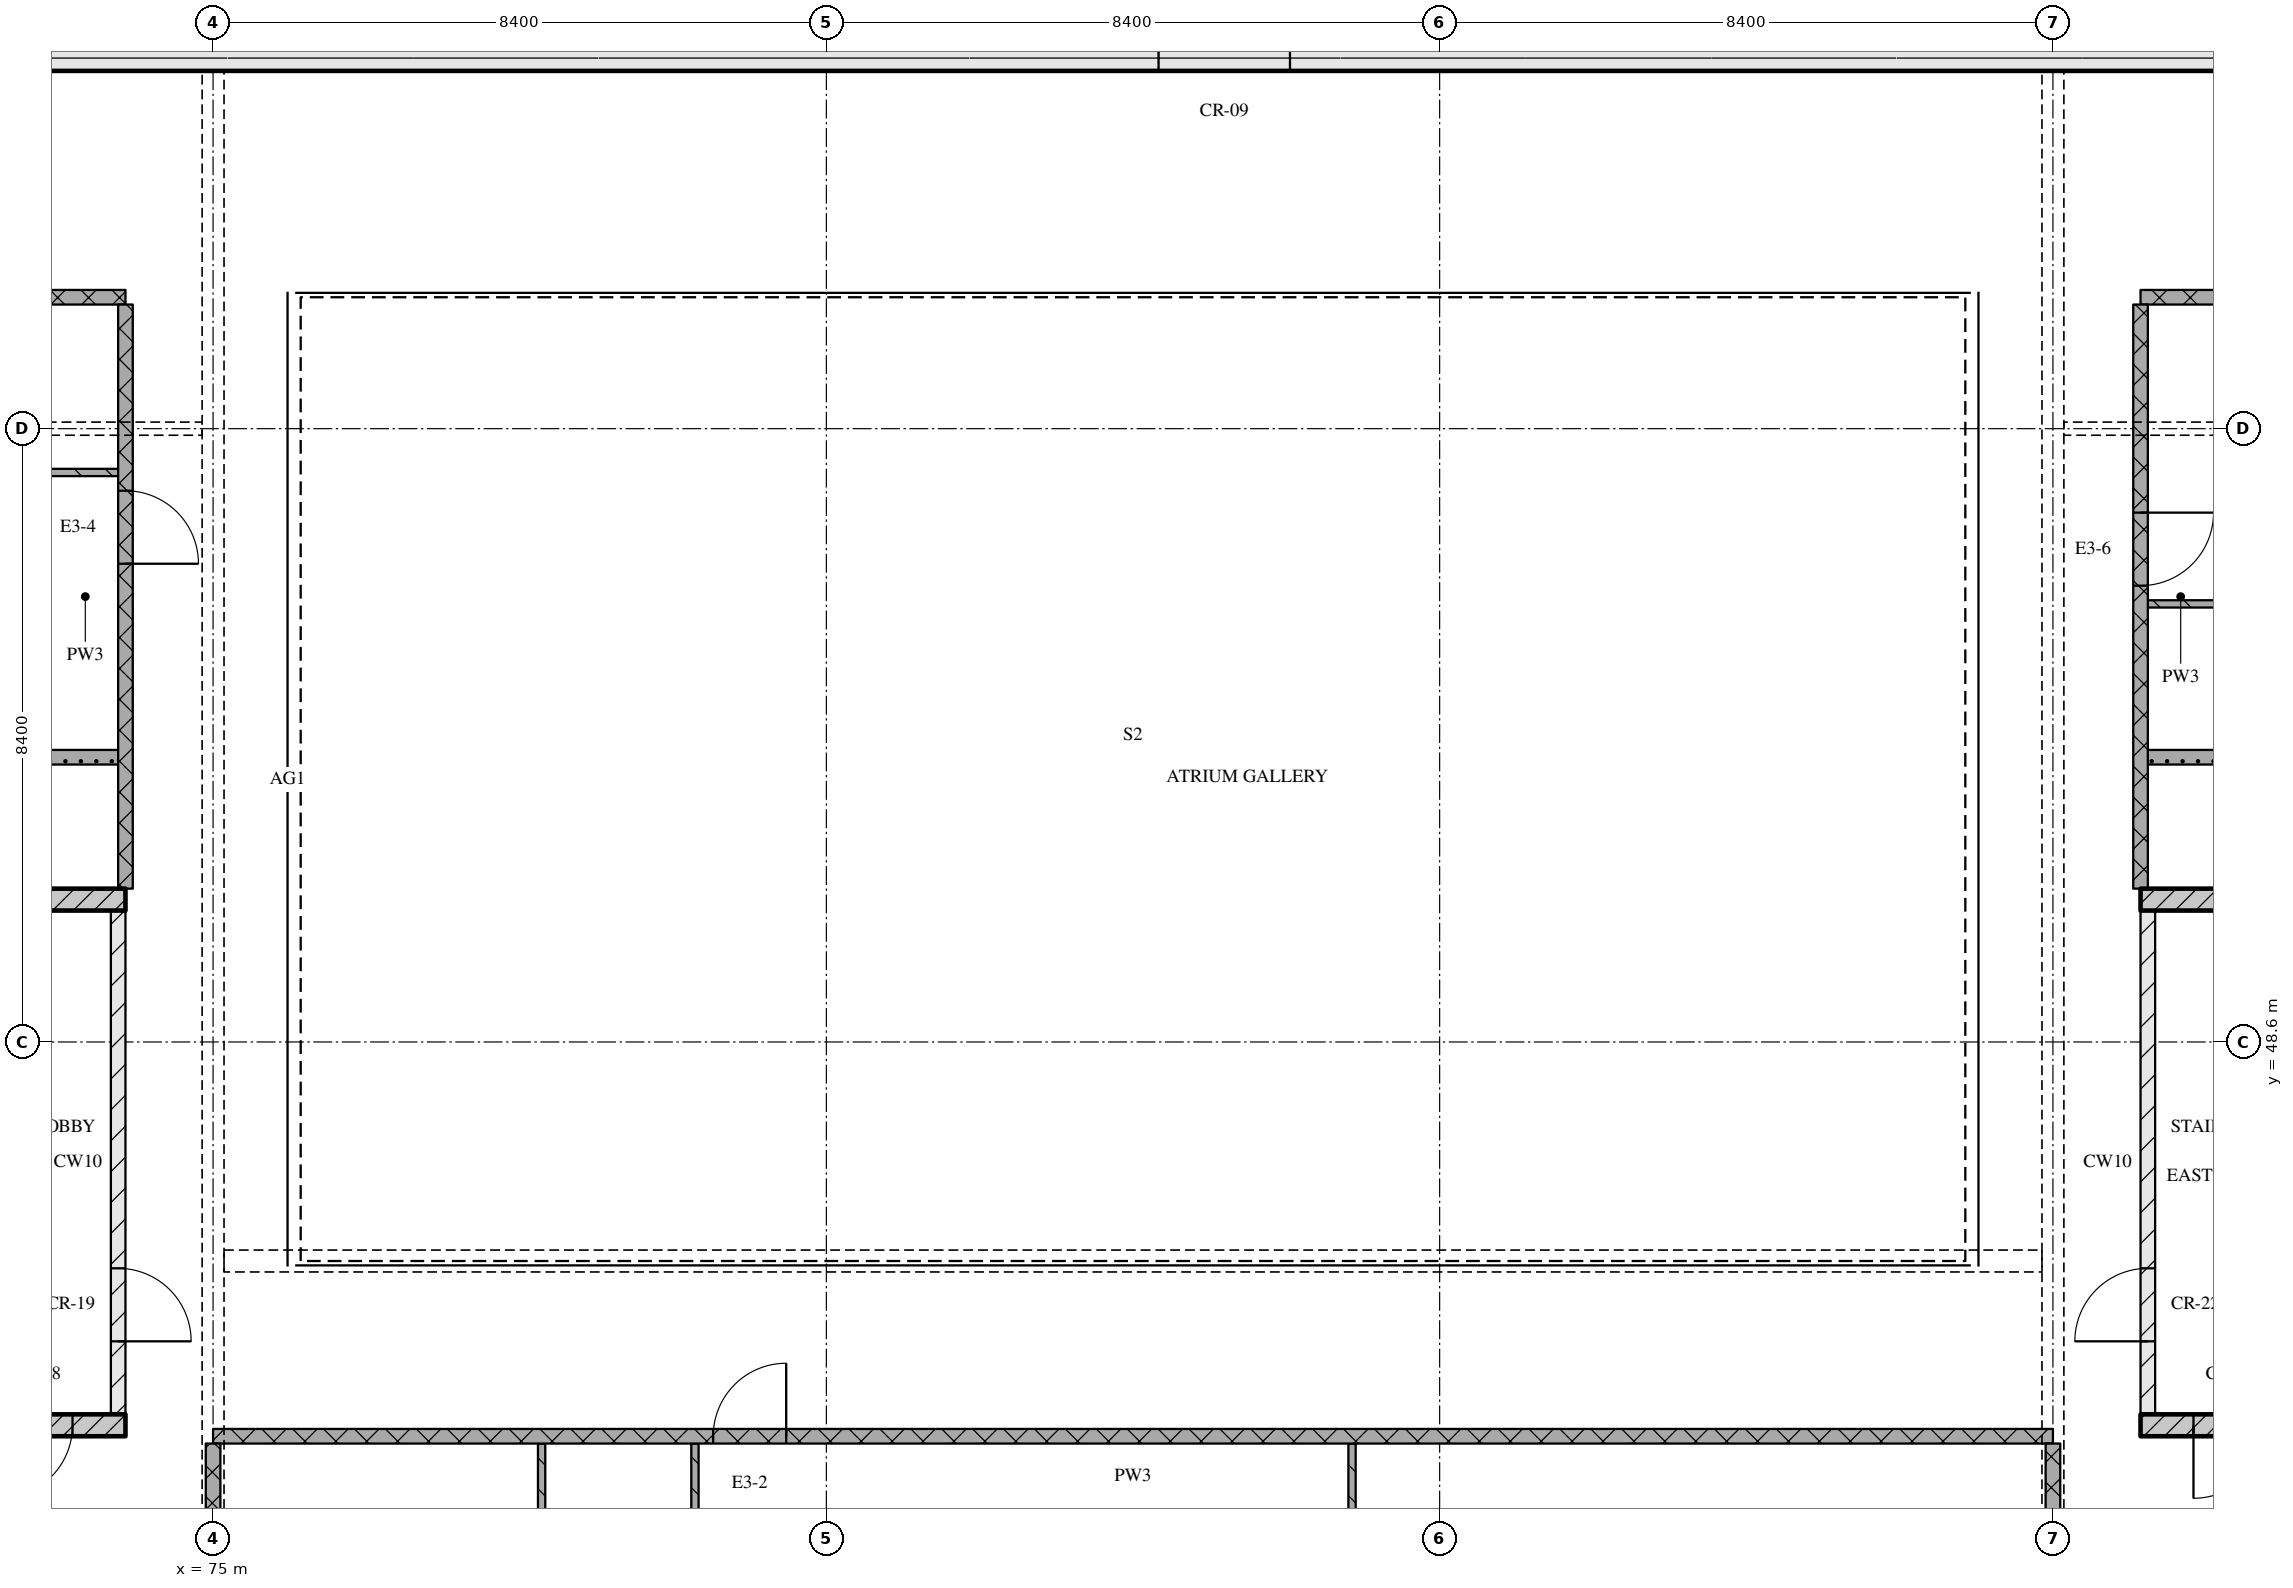
"""IFC4 building model, lengths in metres.
Left out: names, types, materials, properties, quantities, classifications, styles, units other than length and angle.
Written with IfcOpenShell. Run it as: python <this file> out.ifc"""

import sys

from ifc_helpers import new_model, si_unit, direction, frame, frame_2d, origin, place, context, subcontext, project, spatial, rectangle, extrude, element, fill, save


model = new_model("IFC4")
c1 = context("Model", 3, precision=1e-05, world=origin(), true_north=direction((0.0, 1.0)))
c2 = subcontext(c1, "Body", "Model", "MODEL_VIEW")
j1 = project(units=[si_unit("LENGTHUNIT", "METRE"), si_unit("PLANEANGLEUNIT", "RADIAN")], contexts=[c1])
p1 = place(None, origin())
s1 = spatial("IfcSite", under=j1, at=p1, CompositionType="ELEMENT")
p2 = place(p1, origin())
s2 = spatial("IfcBuilding", under=s1, at=p2, CompositionType="ELEMENT")
p3 = place(p2, frame((0.0, 0.0, 277.95)))
s3 = spatial("IfcBuildingStorey", under=s2, at=p3, CompositionType="ELEMENT", Elevation=277.95)
p4 = place(p3, frame((67.3, 62.15, 0.0), z_axis=(0.0, 0.0, 1.0), x_axis=(1.0, 0.0, 0.0)))
e1 = element("IfcWall", 1, at=p4, inside=s3, PredefinedType="SOLIDWALL", context=c2, shape_type="SweptSolid", body=[
    extrude(rectangle(XDim=40.6, YDim=0.5, at=frame_2d((20.3, 0.0))), origin(), (0.0, 0.0, 1.0), 3.32),
])
p5 = place(p4, frame((20.65, 0.0, 0.0)))
e2 = element("IfcOpeningElement", 2, at=p5, cuts=e1, PredefinedType="OPENING", context=c2, shape_type="SweptSolid", body=[
    extrude(rectangle(XDim=1.8, YDim=2.1, at=frame_2d((0.9, 1.05))), frame((0.0, 0.26, 0.0), z_axis=(0.0, -1.0, 0.0), x_axis=(1.0, 0.0, 0.0)), (0.0, 0.0, 1.0), 0.52),
])
p6 = place(p3, frame((68.2, 43.35, 0.0), z_axis=(0.0, 0.0, 1.0), x_axis=(1.0, 0.0, 0.0)))
e3 = element("IfcWall", 3, at=p6, inside=s3, PredefinedType="SOLIDWALL", context=c2, shape_type="SweptSolid", body=[
    extrude(rectangle(XDim=5.6, YDim=0.3, at=frame_2d((2.8, 0.0))), origin(), (0.0, 0.0, 1.0), 3.32),
])
p7 = place(p6, frame((3.875, 0.0, 0.0)))
e4 = element("IfcOpeningElement", 4, at=p7, cuts=e3, PredefinedType="OPENING", context=c2, shape_type="SweptSolid", body=[
    extrude(rectangle(XDim=1.0, YDim=2.1, at=frame_2d((0.5, 1.05))), frame((0.0, 0.16, 0.0), z_axis=(0.0, -1.0, 0.0), x_axis=(1.0, 0.0, 0.0)), (0.0, 0.0, 1.0), 0.32),
])
p8 = place(p3, frame((73.7, 43.5, 0.0), z_axis=(0.0, 0.0, 1.0), x_axis=(0.0, 1.0, 0.0)))
e5 = element("IfcWall", 5, at=p8, inside=s3, PredefinedType="PARTITIONING", context=c2, shape_type="SweptSolid", body=[
    extrude(rectangle(XDim=6.9, YDim=0.2, at=frame_2d((3.45, 0.0))), origin(), (0.0, 0.0, 1.0), 3.32),
])
p9 = place(p8, frame((1.0, 0.0, 0.0)))
e6 = element("IfcOpeningElement", 6, at=p9, cuts=e5, PredefinedType="OPENING", context=c2, shape_type="SweptSolid", body=[
    extrude(rectangle(XDim=1.0, YDim=2.1, at=frame_2d((0.5, 1.05))), frame((0.0, 0.11, 0.0), z_axis=(0.0, -1.0, 0.0), x_axis=(1.0, 0.0, 0.0)), (0.0, 0.0, 1.0), 0.22),
])
p10 = place(p3, frame((68.2, 50.55, 0.0), z_axis=(0.0, 0.0, 1.0), x_axis=(1.0, 0.0, 0.0)))
e7 = element("IfcWall", 7, at=p10, inside=s3, PredefinedType="SOLIDWALL", context=c2, shape_type="SweptSolid", body=[
    extrude(rectangle(XDim=5.6, YDim=0.3, at=frame_2d((2.8, 0.0))), origin(), (0.0, 0.0, 1.0), 3.32),
])
p11 = place(p3, frame((101.4, 43.35, 0.0), z_axis=(0.0, 0.0, 1.0), x_axis=(1.0, 0.0, 0.0)))
e8 = element("IfcWall", 8, at=p11, inside=s3, PredefinedType="SOLIDWALL", context=c2, shape_type="SweptSolid", body=[
    extrude(rectangle(XDim=5.6, YDim=0.3, at=frame_2d((2.8, 0.0))), origin(), (0.0, 0.0, 1.0), 3.32),
])
p12 = place(p11, frame((0.725, 0.0, 0.0)))
e9 = element("IfcOpeningElement", 9, at=p12, cuts=e8, PredefinedType="OPENING", context=c2, shape_type="SweptSolid", body=[
    extrude(rectangle(XDim=1.0, YDim=2.1, at=frame_2d((0.5, 1.05))), frame((0.0, 0.16, 0.0), z_axis=(0.0, -1.0, 0.0), x_axis=(1.0, 0.0, 0.0)), (0.0, 0.0, 1.0), 0.32),
])
p13 = place(p3, frame((101.5, 43.5, 0.0), z_axis=(0.0, 0.0, 1.0), x_axis=(0.0, 1.0, 0.0)))
e10 = element("IfcWall", 10, at=p13, inside=s3, PredefinedType="PARTITIONING", context=c2, shape_type="SweptSolid", body=[
    extrude(rectangle(XDim=6.9, YDim=0.2, at=frame_2d((3.45, 0.0))), origin(), (0.0, 0.0, 1.0), 3.32),
])
p14 = place(p13, frame((1.0, 0.0, 0.0)))
e11 = element("IfcOpeningElement", 11, at=p14, cuts=e10, PredefinedType="OPENING", context=c2, shape_type="SweptSolid", body=[
    extrude(rectangle(XDim=1.0, YDim=2.1, at=frame_2d((0.5, 1.05))), frame((0.0, 0.11, 0.0), z_axis=(0.0, -1.0, 0.0), x_axis=(1.0, 0.0, 0.0)), (0.0, 0.0, 1.0), 0.22),
])
p15 = place(p3, frame((101.4, 50.55, 0.0), z_axis=(0.0, 0.0, 1.0), x_axis=(1.0, 0.0, 0.0)))
e12 = element("IfcWall", 12, at=p15, inside=s3, PredefinedType="SOLIDWALL", context=c2, shape_type="SweptSolid", body=[
    extrude(rectangle(XDim=5.6, YDim=0.3, at=frame_2d((2.8, 0.0))), origin(), (0.0, 0.0, 1.0), 3.32),
])
p16 = place(p3, frame((100.2, 43.2, 0.0), z_axis=(0.0, 0.0, 1.0), x_axis=(-1.0, 0.0, 0.0)))
e13 = element("IfcWall", 13, at=p16, inside=s3, PredefinedType="PARTITIONING", context=c2, shape_type="SweptSolid", body=[
    extrude(rectangle(XDim=25.2, YDim=0.2, at=frame_2d((12.6, 0.0))), origin(), (0.0, 0.0, 1.0), 3.32),
])
p17 = place(p16, frame((17.35, 0.0, 0.0)))
e14 = element("IfcOpeningElement", 14, at=p17, cuts=e13, PredefinedType="OPENING", context=c2, shape_type="SweptSolid", body=[
    extrude(rectangle(XDim=1.0, YDim=2.1, at=frame_2d((0.5, 1.05))), frame((0.0, 0.11, 0.0), z_axis=(0.0, -1.0, 0.0), x_axis=(1.0, 0.0, 0.0)), (0.0, 0.0, 1.0), 0.22),
])
for number, where, z_axis, x_axis in (
    (15, (56.68, 52.5, 0.0), (0.0, 0.0, 1.0), (1.0, 0.0, 0.0)),
    (16, (101.5, 52.5, 0.0), (0.0, 0.0, 1.0), (1.0, 0.0, 0.0)),
):
    element("IfcWall", number, at=place(p3, frame(where, z_axis=z_axis, x_axis=x_axis)), inside=s3, PredefinedType="PARTITIONING", context=c2, shape_type="SweptSolid", body=[
        extrude(rectangle(XDim=17.02, YDim=0.2, at=frame_2d((8.51, 0.0))), origin(), (0.0, 0.0, 1.0), 3.32),
    ])
for number, where, z_axis, x_axis in (
    (17, (101.5, 54.6, 0.0), (0.0, 0.0, 1.0), (1.0, 0.0, 0.0)),
    (18, (65.7, 56.4, 0.0), (0.0, 0.0, 1.0), (1.0, 0.0, 0.0)),
):
    element("IfcWall", number, at=place(p3, frame(where, z_axis=z_axis, x_axis=x_axis)), inside=s3, PredefinedType="PARTITIONING", context=c2, shape_type="SweptSolid", body=[
        extrude(rectangle(XDim=8.0, YDim=0.1, at=frame_2d((4.0, 0.0))), origin(), (0.0, 0.0, 1.0), 3.32),
    ])
for number, where, z_axis, x_axis in (
    (19, (64.2, 58.8, 0.0), (0.0, 0.0, 1.0), (1.0, 0.0, 0.0)),
    (20, (101.4, 58.8, 0.0), (0.0, 0.0, 1.0), (1.0, 0.0, 0.0)),
):
    element("IfcWall", number, at=place(p3, frame(where, z_axis=z_axis, x_axis=x_axis)), inside=s3, PredefinedType="PARTITIONING", context=c2, shape_type="SweptSolid", body=[
        extrude(rectangle(XDim=9.6, YDim=0.2, at=frame_2d((4.8, 0.0))), origin(), (0.0, 0.0, 1.0), 3.32),
    ])
p18 = place(p3, frame((73.8, 50.7, 0.0), z_axis=(0.0, 0.0, 1.0), x_axis=(0.0, 1.0, 0.0)))
e21 = element("IfcWall", 21, at=p18, inside=s3, PredefinedType="PARTITIONING", context=c2, shape_type="SweptSolid", body=[
    extrude(rectangle(XDim=8.0, YDim=0.2, at=frame_2d((4.0, 0.0))), origin(), (0.0, 0.0, 1.0), 3.32),
])
p19 = place(p18, frame((4.45, 0.0, 0.0)))
e22 = element("IfcOpeningElement", 22, at=p19, cuts=e21, PredefinedType="OPENING", context=c2, shape_type="SweptSolid", body=[
    extrude(rectangle(XDim=1.0, YDim=2.1, at=frame_2d((0.5, 1.05))), frame((0.0, 0.11, 0.0), z_axis=(0.0, -1.0, 0.0), x_axis=(1.0, 0.0, 0.0)), (0.0, 0.0, 1.0), 0.22),
])
p20 = place(p3, frame((75.0, 43.1, 0.0), z_axis=(0.0, 0.0, 1.0), x_axis=(0.0, -1.0, 0.0)))
e23 = element("IfcWall", 23, at=p20, inside=s3, PredefinedType="PARTITIONING", context=c2, shape_type="SweptSolid", body=[
    extrude(rectangle(XDim=2.2, YDim=0.2, at=frame_2d((1.1, 0.0))), origin(), (0.0, 0.0, 1.0), 2.53),
])
p21 = place(p3, frame((79.5, 43.1, 0.0), z_axis=(0.0, 0.0, 1.0), x_axis=(0.0, -1.0, 0.0)))
e24 = element("IfcWall", 24, at=p21, inside=s3, PredefinedType="PARTITIONING", context=c2, shape_type="SweptSolid", body=[
    extrude(rectangle(XDim=4.95, YDim=0.1, at=frame_2d((2.475, 0.0))), origin(), (0.0, 0.0, 1.0), 3.32),
])
p22 = place(p3, frame((81.6, 38.15, 0.0), z_axis=(0.0, 0.0, 1.0), x_axis=(0.0, 1.0, 0.0)))
e25 = element("IfcWall", 25, at=p22, inside=s3, PredefinedType="PARTITIONING", context=c2, shape_type="SweptSolid", body=[
    extrude(rectangle(XDim=4.95, YDim=0.1, at=frame_2d((2.475, 0.0))), origin(), (0.0, 0.0, 1.0), 3.32),
])
p23 = place(p22, frame((2.1, 0.0, 0.0)))
e26 = element("IfcOpeningElement", 26, at=p23, cuts=e25, PredefinedType="OPENING", context=c2, shape_type="SweptSolid", body=[
    extrude(rectangle(XDim=0.8, YDim=2.1, at=frame_2d((0.4, 1.05))), frame((0.0, 0.06, 0.0), z_axis=(0.0, -1.0, 0.0), x_axis=(1.0, 0.0, 0.0)), (0.0, 0.0, 1.0), 0.12),
])
p24 = place(p3, frame((90.6, 43.1, 0.0), z_axis=(0.0, 0.0, 1.0), x_axis=(0.0, -1.0, 0.0)))
e27 = element("IfcWall", 27, at=p24, inside=s3, PredefinedType="PARTITIONING", context=c2, shape_type="SweptSolid", body=[
    extrude(rectangle(XDim=4.95, YDim=0.1, at=frame_2d((2.475, 0.0))), origin(), (0.0, 0.0, 1.0), 3.32),
])
p25 = place(p3, frame((100.2, 43.1, 0.0), z_axis=(0.0, 0.0, 1.0), x_axis=(0.0, -1.0, 0.0)))
e28 = element("IfcWall", 28, at=p25, inside=s3, PredefinedType="PARTITIONING", context=c2, shape_type="SweptSolid", body=[
    extrude(rectangle(XDim=2.2, YDim=0.2, at=frame_2d((1.1, 0.0))), origin(), (0.0, 0.0, 1.0), 2.53),
])
p26 = place(p3, frame((101.4, 58.7, 0.0), z_axis=(0.0, 0.0, 1.0), x_axis=(0.0, -1.0, 0.0)))
e29 = element("IfcWall", 29, at=p26, inside=s3, PredefinedType="PARTITIONING", context=c2, shape_type="SweptSolid", body=[
    extrude(rectangle(XDim=8.0, YDim=0.2, at=frame_2d((4.0, 0.0))), origin(), (0.0, 0.0, 1.0), 3.32),
])
p27 = place(p26, frame((2.85, 0.0, 0.0)))
e30 = element("IfcOpeningElement", 30, at=p27, cuts=e29, PredefinedType="OPENING", context=c2, shape_type="SweptSolid", body=[
    extrude(rectangle(XDim=1.0, YDim=2.1, at=frame_2d((0.5, 1.05))), frame((0.0, 0.11, 0.0), z_axis=(0.0, -1.0, 0.0), x_axis=(1.0, 0.0, 0.0)), (0.0, 0.0, 1.0), 0.22),
])
p28 = place(p5, origin())
e31 = element("IfcDoor", 31, at=p28, inside=s3, OperationType="DOUBLE_DOOR_SINGLE_SWING", PredefinedType="DOOR", context=c2, shape_type="SweptSolid", body=[
    extrude(rectangle(XDim=1.8, YDim=2.1, at=frame_2d((0.9, 1.05))), frame((0.0, 0.025, 0.0), z_axis=(0.0, -1.0, 0.0), x_axis=(1.0, 0.0, 0.0)), (0.0, 0.0, 1.0), 0.05),
])
fill(e2, e31)
p29 = place(p7, origin())
e32 = element("IfcDoor", 32, at=p29, inside=s3, OperationType="SINGLE_SWING_RIGHT", PredefinedType="DOOR", context=c2, shape_type="SweptSolid", body=[
    extrude(rectangle(XDim=1.0, YDim=2.1, at=frame_2d((0.5, 1.05))), frame((0.0, 0.025, 0.0), z_axis=(0.0, -1.0, 0.0), x_axis=(1.0, 0.0, 0.0)), (0.0, 0.0, 1.0), 0.05),
])
fill(e4, e32)
p30 = place(p9, origin())
e33 = element("IfcDoor", 33, at=p30, inside=s3, OperationType="SINGLE_SWING_RIGHT", PredefinedType="DOOR", context=c2, shape_type="SweptSolid", body=[
    extrude(rectangle(XDim=1.0, YDim=2.1, at=frame_2d((0.5, 1.05))), frame((0.0, 0.025, 0.0), z_axis=(0.0, -1.0, 0.0), x_axis=(1.0, 0.0, 0.0)), (0.0, 0.0, 1.0), 0.05),
])
fill(e6, e33)
p31 = place(p12, origin())
e34 = element("IfcDoor", 34, at=p31, inside=s3, OperationType="SINGLE_SWING_RIGHT", PredefinedType="DOOR", context=c2, shape_type="SweptSolid", body=[
    extrude(rectangle(XDim=1.0, YDim=2.1, at=frame_2d((0.5, 1.05))), frame((0.0, 0.025, 0.0), z_axis=(0.0, -1.0, 0.0), x_axis=(1.0, 0.0, 0.0)), (0.0, 0.0, 1.0), 0.05),
])
fill(e9, e34)
p32 = place(p14, origin())
e35 = element("IfcDoor", 35, at=p32, inside=s3, OperationType="SINGLE_SWING_LEFT", PredefinedType="DOOR", context=c2, shape_type="SweptSolid", body=[
    extrude(rectangle(XDim=1.0, YDim=2.1, at=frame_2d((0.5, 1.05))), frame((0.0, 0.025, 0.0), z_axis=(0.0, -1.0, 0.0), x_axis=(1.0, 0.0, 0.0)), (0.0, 0.0, 1.0), 0.05),
])
fill(e11, e35)
p33 = place(p17, origin())
e36 = element("IfcDoor", 36, at=p33, inside=s3, OperationType="SINGLE_SWING_RIGHT", PredefinedType="DOOR", context=c2, shape_type="SweptSolid", body=[
    extrude(rectangle(XDim=1.0, YDim=2.1, at=frame_2d((0.5, 1.05))), frame((0.0, 0.025, 0.0), z_axis=(0.0, -1.0, 0.0), x_axis=(1.0, 0.0, 0.0)), (0.0, 0.0, 1.0), 0.05),
])
fill(e14, e36)
p34 = place(p19, origin())
e37 = element("IfcDoor", 37, at=p34, inside=s3, OperationType="SINGLE_SWING_RIGHT", PredefinedType="DOOR", context=c2, shape_type="SweptSolid", body=[
    extrude(rectangle(XDim=1.0, YDim=2.1, at=frame_2d((0.5, 1.05))), frame((0.0, 0.025, 0.0), z_axis=(0.0, -1.0, 0.0), x_axis=(1.0, 0.0, 0.0)), (0.0, 0.0, 1.0), 0.05),
])
fill(e22, e37)
p35 = place(p27, origin())
e38 = element("IfcDoor", 38, at=p35, inside=s3, OperationType="SINGLE_SWING_LEFT", PredefinedType="DOOR", context=c2, shape_type="SweptSolid", body=[
    extrude(rectangle(XDim=1.0, YDim=2.1, at=frame_2d((0.5, 1.05))), frame((0.0, 0.025, 0.0), z_axis=(0.0, -1.0, 0.0), x_axis=(1.0, 0.0, 0.0)), (0.0, 0.0, 1.0), 0.05),
])
fill(e30, e38)
save(model, sys.argv[1])
